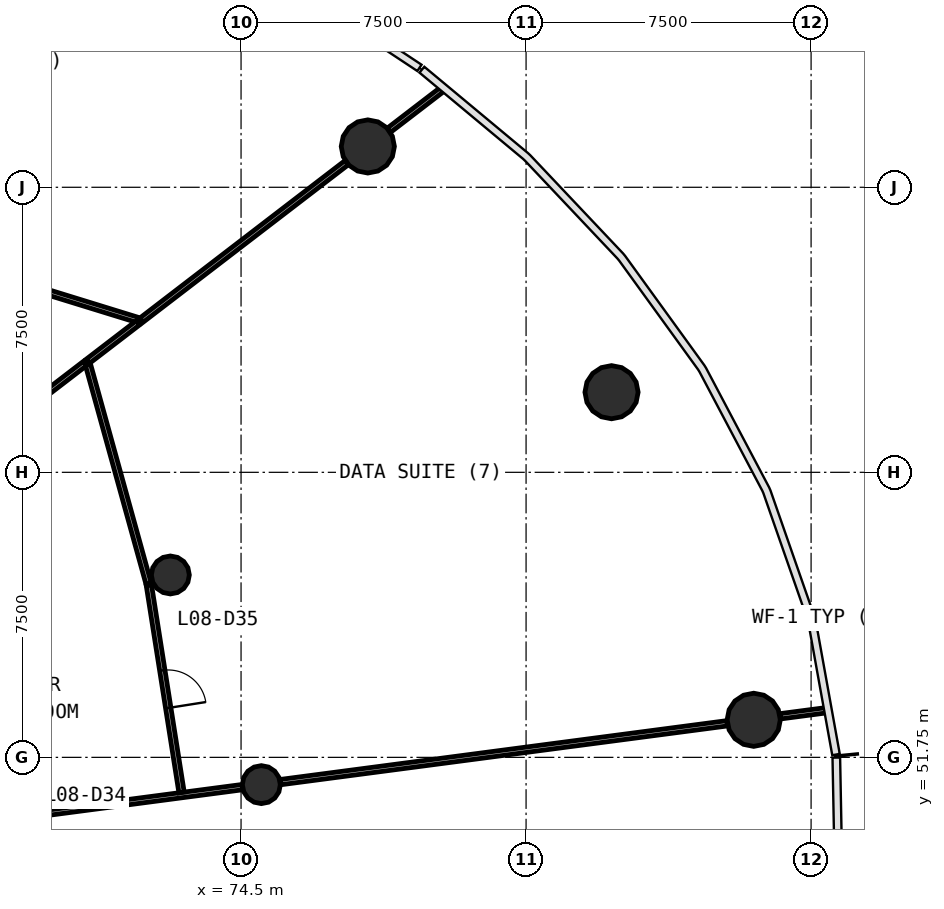
"""IFC4 building model, lengths in metres.
Left out: names, types, materials, properties, quantities, classifications, styles, units other than length and angle.
Written with IfcOpenShell. Run it as: python <this file> out.ifc"""

import sys

from ifc_helpers import new_model, si_unit, direction, frame, frame_2d, origin, origin_2d, place, context, subcontext, project, spatial, rectangle, circle, extrude, source, transform, mapped, element, fill, save


model = new_model("IFC4")
c1 = context("Model", 3, precision=1e-05, world=origin(), true_north=direction((0.0, 1.0)))
c2 = subcontext(c1, "Body", "Model", "MODEL_VIEW")
j1 = project(units=[si_unit("LENGTHUNIT", "METRE"), si_unit("PLANEANGLEUNIT", "RADIAN")], contexts=[c1])
p1 = place(None, origin())
s1 = spatial("IfcSite", under=j1, at=p1, CompositionType="ELEMENT")
p2 = place(p1, origin())
s2 = spatial("IfcBuilding", under=s1, at=p2, CompositionType="ELEMENT")
p3 = place(p2, frame((0.0, 0.0, 35.8)))
s3 = spatial("IfcBuildingStorey", under=s2, at=p3, CompositionType="ELEMENT", Elevation=35.8)
m1 = source(origin(), c2, "Body", "SweptSolid", [
    extrude(circle(Radius=0.7, at=origin_2d()), origin(), (0.0, 0.0, 1.0), 4.4),
])
for number, where, z_axis, x_axis in (
    (1, (87.99, 52.738, 0.0), (0.0, 0.0, 1.0), (1.0, 0.0, 0.0)),
    (2, (84.249, 61.358, 0.0), (0.0, 0.0, 1.0), (1.0, 0.0, 0.0)),
    (3, (77.836, 67.824, 0.0), (0.0, 0.0, 1.0), (1.0, 0.0, 0.0)),
):
    element("IfcColumn", number, at=place(p3, frame(where, z_axis=z_axis, x_axis=x_axis)), inside=s3, PredefinedType="COLUMN", context=c2, shape_type="MappedRepresentation", body=[
        mapped(m1, transform((0.0, 0.0, 0.0), scale=1.0)),
    ])
m2 = source(origin(), c2, "Body", "SweptSolid", [
    extrude(circle(Radius=0.5, at=origin_2d()), origin(), (0.0, 0.0, 1.0), 4.4),
])
for number, where, z_axis, x_axis in (
    (4, (75.034, 51.032, 0.0), (0.0, 0.0, 1.0), (1.0, 0.0, 0.0)),
    (5, (72.639, 56.549, 0.0), (0.0, 0.0, 1.0), (1.0, 0.0, 0.0)),
):
    element("IfcColumn", number, at=place(p3, frame(where, z_axis=z_axis, x_axis=x_axis)), inside=s3, PredefinedType="COLUMN", context=c2, shape_type="MappedRepresentation", body=[
        mapped(m2, transform((0.0, 0.0, 0.0), scale=1.0)),
    ])
p4 = place(p3, frame((75.534, 51.098, 0.0), z_axis=(0.0, 0.0, 1.0), x_axis=(0.991446586451, 0.130513088287, 0.0)))
e6 = element("IfcWall", 6, at=p4, inside=s3, PredefinedType="PARTITIONING", context=c2, shape_type="SweptSolid", body=[
    extrude(rectangle(XDim=11.86, YDim=0.14, at=frame_2d((5.93, 0.0))), origin(), (0.0, 0.0, 1.0), 3.05),
])
p5 = place(p3, frame((74.534, 50.967, 0.0), z_axis=(0.0, 0.0, 1.0), x_axis=(-0.99144622305, -0.130515848849, 0.0)))
e7 = element("IfcWall", 7, at=p5, inside=s3, PredefinedType="PARTITIONING", context=c2, shape_type="SweptSolid", body=[
    extrude(rectangle(XDim=7.104, YDim=0.14, at=frame_2d((3.552, 0.0))), origin(), (0.0, 0.0, 1.0), 3.05),
])
p6 = place(p3, frame((71.855, 63.236, 0.0), z_axis=(0.0, 0.0, 1.0), x_axis=(-0.955628382182, 0.294574939816, 0.0)))
e8 = element("IfcWall", 8, at=p6, inside=s3, PredefinedType="PARTITIONING", context=c2, shape_type="SweptSolid", body=[
    extrude(rectangle(XDim=6.91, YDim=0.14, at=frame_2d((3.455, 0.0))), origin(), (0.0, 0.0, 1.0), 3.05),
])
p7 = place(p3, frame((71.879, 63.254, 0.0), z_axis=(0.0, 0.0, 1.0), x_axis=(0.793367765852, 0.60874262879, 0.0)))
e9 = element("IfcWall", 9, at=p7, inside=s3, PredefinedType="PARTITIONING", context=c2, shape_type="SweptSolid", body=[
    extrude(rectangle(XDim=6.803, YDim=0.14, at=frame_2d((3.402, 0.0))), origin(), (0.0, 0.0, 1.0), 3.05),
])
p8 = place(p3, frame((72.069, 56.313, 0.0), z_axis=(0.0, 0.0, 1.0), x_axis=(-0.26694408294, 0.963712019528, 0.0)))
e10 = element("IfcWall", 10, at=p8, inside=s3, PredefinedType="PARTITIONING", context=c2, shape_type="SweptSolid", body=[
    extrude(rectangle(XDim=6.064, YDim=0.14, at=frame_2d((3.032, 0.0))), origin(), (0.0, 0.0, 1.0), 3.05),
])
p9 = place(p3, frame((72.074, 56.283, 0.0), z_axis=(0.0, 0.0, 1.0), x_axis=(0.155785554146, -0.987790899492, 0.0)))
e11 = element("IfcWall", 11, at=p9, inside=s3, PredefinedType="PARTITIONING", context=c2, shape_type="SweptSolid", body=[
    extrude(rectangle(XDim=5.524, YDim=0.14, at=frame_2d((2.762, 0.0))), origin(), (0.0, 0.0, 1.0), 3.05),
])
p10 = place(p9, frame((2.274, 0.0, 0.0)))
e12 = element("IfcOpeningElement", 12, at=p10, cuts=e11, PredefinedType="OPENING", context=c2, shape_type="SweptSolid", body=[
    extrude(rectangle(XDim=1.0, YDim=2.1, at=frame_2d((0.5, 1.05))), frame((0.0, 0.08, 0.0), z_axis=(0.0, -1.0, 0.0), x_axis=(1.0, 0.0, 0.0)), (0.0, 0.0, 1.0), 0.16),
])
p11 = place(p3, frame((68.935, 60.995, 0.0), z_axis=(0.0, 0.0, 1.0), x_axis=(0.793340711993, 0.608777886174, 0.0)))
e13 = element("IfcWall", 13, at=p11, inside=s3, PredefinedType="PARTITIONING", context=c2, shape_type="SweptSolid", body=[
    extrude(rectangle(XDim=1.835, YDim=0.14, at=frame_2d((0.917, 0.0))), origin(), (0.0, 0.0, 1.0), 3.05),
])
p12 = place(p3, frame((70.474, 62.176, 0.0), z_axis=(0.0, 0.0, 1.0), x_axis=(0.793330865264, 0.608790717915, 0.0)))
e14 = element("IfcWall", 14, at=p12, inside=s3, PredefinedType="PARTITIONING", context=c2, shape_type="SweptSolid", body=[
    extrude(rectangle(XDim=1.655, YDim=0.14, at=frame_2d((0.828, 0.0))), origin(), (0.0, 0.0, 1.0), 3.05),
])
p13 = place(p3, frame((78.394, 68.253, 0.0), z_axis=(0.0, 0.0, 1.0), x_axis=(0.793373884705, 0.608734654071, 0.0)))
e15 = element("IfcWall", 15, at=p13, inside=s3, PredefinedType="PARTITIONING", context=c2, shape_type="SweptSolid", body=[
    extrude(rectangle(XDim=1.741, YDim=0.14, at=frame_2d((0.871, 0.0))), origin(), (0.0, 0.0, 1.0), 3.05),
])
p14 = place(p3, frame((88.689, 52.83, 0.0), z_axis=(0.0, 0.0, 1.0), x_axis=(0.991431129538, 0.130630453508, 0.0)))
e16 = element("IfcWall", 16, at=p14, inside=s3, PredefinedType="PARTITIONING", context=c2, shape_type="SweptSolid", body=[
    extrude(rectangle(XDim=1.22, YDim=0.14, at=frame_2d((0.61, 0.0))), origin(), (0.0, 0.0, 1.0), 3.05),
])
m3 = source(origin(), c2, "Body", "SweptSolid", [
    extrude(rectangle(XDim=1.0, YDim=2.1, at=frame_2d((0.5, 1.05))), frame((0.0, 0.025, 0.0), z_axis=(0.0, -1.0, 0.0), x_axis=(1.0, 0.0, 0.0)), (0.0, 0.0, 1.0), 0.05),
])
p15 = place(p10, origin())
e17 = element("IfcDoor", 17, at=p15, inside=s3, OperationType="SINGLE_SWING_RIGHT", PredefinedType="DOOR", context=c2, shape_type="MappedRepresentation", body=[
    mapped(m3, transform((0.0, 0.0, 0.0), scale=1.0)),
])
fill(e12, e17)
save(model, sys.argv[1])
